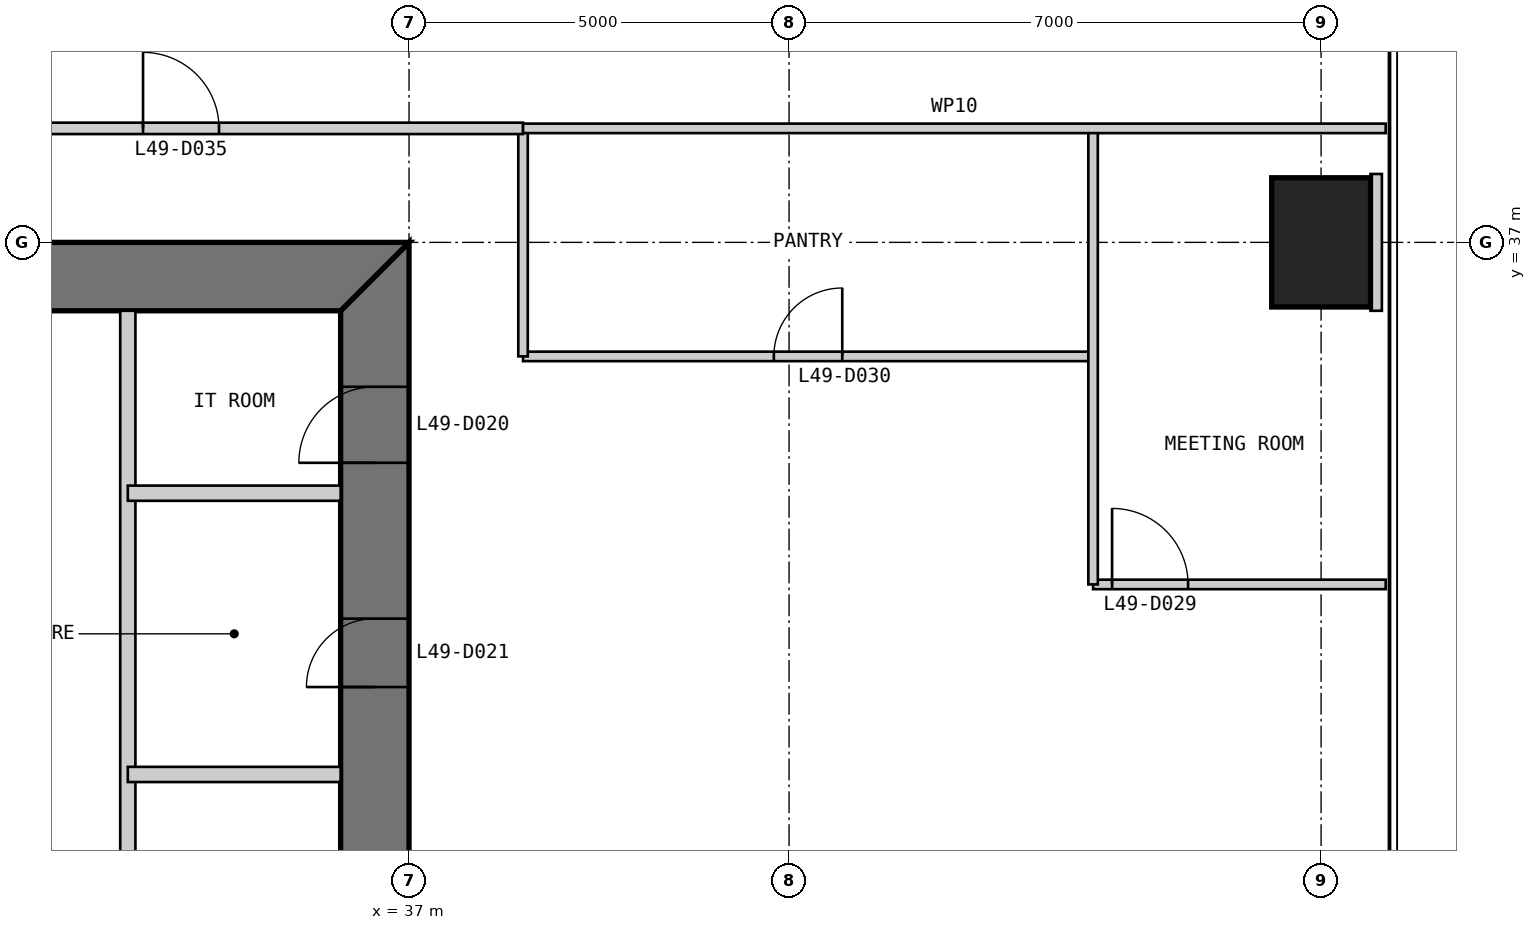
"""IFC4 building model, lengths in metres.
Left out: names, types, materials, properties, quantities, classifications, styles, units other than length and angle.
Written with IfcOpenShell. Run it as: python <this file> out.ifc"""

import sys

from ifc_helpers import new_model, si_unit, direction, frame, frame_2d, origin, origin_2d, place, context, subcontext, project, spatial, polyline, rectangle, outline, extrude, element, fill, save


model = new_model("IFC4")
c1 = context("Model", 3, precision=1e-05, world=origin(), true_north=direction((0.0, 1.0)))
c2 = subcontext(c1, "Body", "Model", "MODEL_VIEW")
j1 = project(units=[si_unit("LENGTHUNIT", "METRE"), si_unit("PLANEANGLEUNIT", "RADIAN")], contexts=[c1])
p1 = place(None, origin())
s1 = spatial("IfcSite", under=j1, at=p1, CompositionType="ELEMENT")
p2 = place(p1, origin())
s2 = spatial("IfcBuilding", under=s1, at=p2, CompositionType="ELEMENT")
p3 = place(p2, frame((0.0, 0.0, 209.8)))
s3 = spatial("IfcBuildingStorey", under=s2, at=p3, CompositionType="ELEMENT", Elevation=209.8)
p4 = place(p3, frame((49.0, 37.0, 0.0), z_axis=(0.0, 0.0, 1.0), x_axis=(1.0, 0.0, 0.0)))
e1 = element("IfcColumn", 1, at=p4, inside=s3, PredefinedType="COLUMN", context=c2, shape_type="SweptSolid", body=[
    extrude(rectangle(XDim=1.3, YDim=1.7, at=origin_2d()), origin(), (0.0, 0.0, 1.0), 4.0),
])
p5 = place(p3, frame((36.55, 13.9, 0.0), z_axis=(0.0, 0.0, 1.0), x_axis=(0.0, 1.0, 0.0)))
e2 = element("IfcWall", 2, at=p5, inside=s3, PredefinedType="SHEAR", context=c2, shape_type="SweptSolid", body=[
    extrude(outline(polyline([(-0.9, -0.45), (23.1, -0.45), (22.2, 0.45), (0.0, 0.45), (-0.9, -0.45)])), origin(), (0.0, 0.0, 1.0), 4.0),
])
p6 = place(p5, frame((20.2, 0.0, 0.0)))
e3 = element("IfcOpeningElement", 3, at=p6, cuts=e2, PredefinedType="OPENING", context=c2, shape_type="SweptSolid", body=[
    extrude(rectangle(XDim=1.0, YDim=2.2, at=frame_2d((0.5, 1.1))), frame((0.0, 0.46, 0.0), z_axis=(0.0, -1.0, 0.0), x_axis=(1.0, 0.0, 0.0)), (0.0, 0.0, 1.0), 0.92),
])
p7 = place(p5, frame((17.25, 0.0, 0.0)))
e4 = element("IfcOpeningElement", 4, at=p7, cuts=e2, PredefinedType="OPENING", context=c2, shape_type="SweptSolid", body=[
    extrude(rectangle(XDim=0.9, YDim=2.2, at=frame_2d((0.45, 1.1))), frame((0.0, 0.46, 0.0), z_axis=(0.0, -1.0, 0.0), x_axis=(1.0, 0.0, 0.0)), (0.0, 0.0, 1.0), 0.92),
])
p8 = place(p3, frame((37.0, 36.55, 0.0), z_axis=(0.0, 0.0, 1.0), x_axis=(-1.0, 0.0, 0.0)))
e5 = element("IfcWall", 5, at=p8, inside=s3, PredefinedType="SHEAR", context=c2, shape_type="SweptSolid", body=[
    extrude(outline(polyline([(0.0, -0.45), (24.0, -0.45), (23.1, 0.45), (0.9, 0.45), (0.0, -0.45)])), origin(), (0.0, 0.0, 1.0), 4.0),
])
p9 = place(p8, frame((4.9, 0.0, 0.0)))
e6 = element("IfcOpeningElement", 6, at=p9, cuts=e5, PredefinedType="OPENING", context=c2, shape_type="SweptSolid", body=[
    extrude(rectangle(XDim=1.0, YDim=2.2, at=frame_2d((0.5, 1.1))), frame((0.0, 0.46, 0.0), z_axis=(0.0, -1.0, 0.0), x_axis=(1.0, 0.0, 0.0)), (0.0, 0.0, 1.0), 0.92),
])
p10 = place(p8, frame((8.9, 0.0, 0.0)))
e7 = element("IfcOpeningElement", 7, at=p10, cuts=e5, PredefinedType="OPENING", context=c2, shape_type="SweptSolid", body=[
    extrude(rectangle(XDim=1.1, YDim=2.2, at=frame_2d((0.55, 1.1))), frame((0.0, 0.46, 0.0), z_axis=(0.0, -1.0, 0.0), x_axis=(1.0, 0.0, 0.0)), (0.0, 0.0, 1.0), 0.92),
])
p11 = place(p8, frame((15.05, 0.0, 0.0)))
e8 = element("IfcOpeningElement", 8, at=p11, cuts=e5, PredefinedType="OPENING", context=c2, shape_type="SweptSolid", body=[
    extrude(rectangle(XDim=0.9, YDim=2.2, at=frame_2d((0.45, 1.1))), frame((0.0, 0.46, 0.0), z_axis=(0.0, -1.0, 0.0), x_axis=(1.0, 0.0, 0.0)), (0.0, 0.0, 1.0), 0.92),
])
p12 = place(p8, frame((17.9, 0.0, 0.0)))
e9 = element("IfcOpeningElement", 9, at=p12, cuts=e5, PredefinedType="OPENING", context=c2, shape_type="SweptSolid", body=[
    extrude(rectangle(XDim=1.0, YDim=2.2, at=frame_2d((0.5, 1.1))), frame((0.0, 0.46, 0.0), z_axis=(0.0, -1.0, 0.0), x_axis=(1.0, 0.0, 0.0)), (0.0, 0.0, 1.0), 0.92),
])
p13 = place(p8, frame((21.4, 0.0, 0.0)))
e10 = element("IfcOpeningElement", 10, at=p13, cuts=e5, PredefinedType="OPENING", context=c2, shape_type="SweptSolid", body=[
    extrude(rectangle(XDim=1.0, YDim=2.2, at=frame_2d((0.5, 1.1))), frame((0.0, 0.46, 0.0), z_axis=(0.0, -1.0, 0.0), x_axis=(1.0, 0.0, 0.0)), (0.0, 0.0, 1.0), 0.92),
])
p14 = place(p3, frame((33.3, 36.1, 0.0), z_axis=(0.0, 0.0, 1.0), x_axis=(0.0, -1.0, 0.0)))
e11 = element("IfcWall", 11, at=p14, inside=s3, PredefinedType="PARTITIONING", context=c2, shape_type="SweptSolid", body=[
    extrude(rectangle(XDim=16.1, YDim=0.2, at=frame_2d((8.05, 0.0))), origin(), (0.0, 0.0, 1.0), 3.8),
])
for number, where, z_axis, x_axis in (
    (12, (36.1, 30.0, 0.0), (0.0, 0.0, 1.0), (-1.0, 0.0, 0.0)),
    (13, (36.1, 33.7, 0.0), (0.0, 0.0, 1.0), (-1.0, 0.0, 0.0)),
):
    element("IfcWall", number, at=place(p3, frame(where, z_axis=z_axis, x_axis=x_axis)), inside=s3, PredefinedType="PARTITIONING", context=c2, shape_type="SweptSolid", body=[
        extrude(rectangle(XDim=2.8, YDim=0.2, at=frame_2d((1.4, 0.0))), origin(), (0.0, 0.0, 1.0), 3.8),
    ])
p15 = place(p3, frame((49.85, 32.5, 0.0), z_axis=(0.0, 0.0, 1.0), x_axis=(-1.0, 0.0, 0.0)))
e14 = element("IfcWall", 14, at=p15, inside=s3, PredefinedType="PARTITIONING", context=c2, shape_type="SweptSolid", body=[
    extrude(rectangle(XDim=3.85, YDim=0.125, at=frame_2d((1.925, 0.0))), origin(), (0.0, 0.0, 1.0), 3.85),
])
p16 = place(p15, frame((2.6, 0.0, 0.0)))
e15 = element("IfcOpeningElement", 15, at=p16, cuts=e14, PredefinedType="OPENING", context=c2, shape_type="SweptSolid", body=[
    extrude(rectangle(XDim=1.0, YDim=2.2, at=frame_2d((0.5, 1.1))), frame((0.0, 0.073, 0.0), z_axis=(0.0, -1.0, 0.0), x_axis=(1.0, 0.0, 0.0)), (0.0, 0.0, 1.0), 0.145),
])
p17 = place(p3, frame((46.0, 35.5, 0.0), z_axis=(0.0, 0.0, 1.0), x_axis=(-1.0, 0.0, 0.0)))
e16 = element("IfcWall", 16, at=p17, inside=s3, PredefinedType="PARTITIONING", context=c2, shape_type="SweptSolid", body=[
    extrude(rectangle(XDim=7.5, YDim=0.125, at=frame_2d((3.75, 0.0))), origin(), (0.0, 0.0, 1.0), 3.85),
])
p18 = place(p17, frame((3.3, 0.0, 0.0)))
e17 = element("IfcOpeningElement", 17, at=p18, cuts=e16, PredefinedType="OPENING", context=c2, shape_type="SweptSolid", body=[
    extrude(rectangle(XDim=0.9, YDim=2.2, at=frame_2d((0.45, 1.1))), frame((0.0, 0.073, 0.0), z_axis=(0.0, -1.0, 0.0), x_axis=(1.0, 0.0, 0.0)), (0.0, 0.0, 1.0), 0.145),
])
p19 = place(p3, frame((46.0, 32.5, 0.0), z_axis=(0.0, 0.0, 1.0), x_axis=(0.0, 1.0, 0.0)))
e18 = element("IfcWall", 18, at=p19, inside=s3, PredefinedType="PARTITIONING", context=c2, shape_type="SweptSolid", body=[
    extrude(rectangle(XDim=6.0, YDim=0.125, at=frame_2d((3.0, 0.0))), origin(), (0.0, 0.0, 1.0), 3.238),
])
p20 = place(p3, frame((38.5, 35.5, 0.0), z_axis=(0.0, 0.0, 1.0), x_axis=(0.0, 1.0, 0.0)))
e19 = element("IfcWall", 19, at=p20, inside=s3, PredefinedType="PARTITIONING", context=c2, shape_type="SweptSolid", body=[
    extrude(rectangle(XDim=3.0, YDim=0.125, at=frame_2d((1.5, 0.0))), origin(), (0.0, 0.0, 1.0), 3.85),
])
p21 = place(p3, frame((38.5, 38.5, 0.0), z_axis=(0.0, 0.0, 1.0), x_axis=(-1.0, 0.0, 0.0)))
e20 = element("IfcWall", 20, at=p21, inside=s3, PredefinedType="PARTITIONING", context=c2, shape_type="SweptSolid", body=[
    extrude(rectangle(XDim=27.0, YDim=0.15, at=frame_2d((13.5, 0.0))), origin(), (0.0, 0.0, 1.0), 3.85),
])
p22 = place(p21, frame((13.0, 0.0, 0.0)))
e21 = element("IfcOpeningElement", 21, at=p22, cuts=e20, PredefinedType="OPENING", context=c2, shape_type="SweptSolid", body=[
    extrude(rectangle(XDim=1.0, YDim=2.2, at=frame_2d((0.5, 1.1))), frame((0.0, 0.085, 0.0), z_axis=(0.0, -1.0, 0.0), x_axis=(1.0, 0.0, 0.0)), (0.0, 0.0, 1.0), 0.17),
])
p23 = place(p21, frame((4.0, 0.0, 0.0)))
e22 = element("IfcOpeningElement", 22, at=p23, cuts=e20, PredefinedType="OPENING", context=c2, shape_type="SweptSolid", body=[
    extrude(rectangle(XDim=1.0, YDim=2.2, at=frame_2d((0.5, 1.1))), frame((0.0, 0.085, 0.0), z_axis=(0.0, -1.0, 0.0), x_axis=(1.0, 0.0, 0.0)), (0.0, 0.0, 1.0), 0.17),
])
p24 = place(p21, frame((22.0, 0.0, 0.0)))
e23 = element("IfcOpeningElement", 23, at=p24, cuts=e20, PredefinedType="OPENING", context=c2, shape_type="SweptSolid", body=[
    extrude(rectangle(XDim=1.0, YDim=2.2, at=frame_2d((0.5, 1.1))), frame((0.0, 0.085, 0.0), z_axis=(0.0, -1.0, 0.0), x_axis=(1.0, 0.0, 0.0)), (0.0, 0.0, 1.0), 0.17),
])
p25 = place(p21, frame((25.0, 0.0, 0.0)))
e24 = element("IfcOpeningElement", 24, at=p25, cuts=e20, PredefinedType="OPENING", context=c2, shape_type="SweptSolid", body=[
    extrude(rectangle(XDim=1.0, YDim=2.2, at=frame_2d((0.5, 1.1))), frame((0.0, 0.085, 0.0), z_axis=(0.0, -1.0, 0.0), x_axis=(1.0, 0.0, 0.0)), (0.0, 0.0, 1.0), 0.17),
])
p26 = place(p3, frame((49.85, 38.5, 0.0), z_axis=(0.0, 0.0, 1.0), x_axis=(-1.0, 0.0, 0.0)))
e25 = element("IfcWall", 25, at=p26, inside=s3, PredefinedType="PARTITIONING", context=c2, shape_type="SweptSolid", body=[
    extrude(rectangle(XDim=11.35, YDim=0.125, at=frame_2d((5.675, 0.0))), origin(), (0.0, 0.0, 1.0), 3.85),
])
p27 = place(p3, frame((49.8, 37.0, 0.0), z_axis=(0.0, 0.0, 1.0), x_axis=(-1.0, 0.0, 0.0)))
e26 = element("IfcWall", 26, at=p27, inside=s3, PredefinedType="PARTITIONING", context=c2, shape_type="SweptSolid", body=[
    extrude(rectangle(XDim=0.15, YDim=1.8, at=frame_2d((0.075, 0.0))), origin(), (0.0, 0.0, 1.0), 3.85),
])
p28 = place(p6, origin())
e27 = element("IfcDoor", 27, at=p28, inside=s3, OperationType="SINGLE_SWING_LEFT", PredefinedType="DOOR", context=c2, shape_type="SweptSolid", body=[
    extrude(rectangle(XDim=1.0, YDim=2.2, at=frame_2d((0.5, 1.1))), frame((0.0, 0.025, 0.0), z_axis=(0.0, -1.0, 0.0), x_axis=(1.0, 0.0, 0.0)), (0.0, 0.0, 1.0), 0.05),
    extrude(outline(polyline([(0.0, 0.0), (0.04, 0.0), (0.04, 2.16), (0.96, 2.16), (0.96, 0.0), (1.0, 0.0), (1.0, 2.2), (0.0, 2.2), (0.0, 0.0)])), frame((0.0, 0.3, 0.0), z_axis=(0.0, -1.0, 0.0), x_axis=(1.0, 0.0, 0.0)), (0.0, 0.0, 1.0), 0.6),
])
fill(e3, e27)
p29 = place(p7, origin())
e28 = element("IfcDoor", 28, at=p29, inside=s3, OperationType="SINGLE_SWING_LEFT", PredefinedType="DOOR", context=c2, shape_type="SweptSolid", body=[
    extrude(rectangle(XDim=0.9, YDim=2.2, at=frame_2d((0.45, 1.1))), frame((0.0, 0.025, 0.0), z_axis=(0.0, -1.0, 0.0), x_axis=(1.0, 0.0, 0.0)), (0.0, 0.0, 1.0), 0.05),
    extrude(outline(polyline([(0.0, 0.0), (0.04, 0.0), (0.04, 2.16), (0.86, 2.16), (0.86, 0.0), (0.9, 0.0), (0.9, 2.2), (0.0, 2.2), (0.0, 0.0)])), frame((0.0, 0.3, 0.0), z_axis=(0.0, -1.0, 0.0), x_axis=(1.0, 0.0, 0.0)), (0.0, 0.0, 1.0), 0.6),
])
fill(e4, e28)
p30 = place(p16, frame((1.0, 0.0, 0.0), z_axis=(0.0, 0.0, 1.0), x_axis=(-1.0, 0.0, 0.0)))
e29 = element("IfcDoor", 29, at=p30, inside=s3, OperationType="SINGLE_SWING_LEFT", PredefinedType="DOOR", context=c2, shape_type="SweptSolid", body=[
    extrude(rectangle(XDim=1.0, YDim=2.2, at=frame_2d((0.5, 1.1))), frame((0.0, 0.025, 0.0), z_axis=(0.0, -1.0, 0.0), x_axis=(1.0, 0.0, 0.0)), (0.0, 0.0, 1.0), 0.05),
])
fill(e15, e29)
p31 = place(p18, frame((0.9, 0.0, 0.0), z_axis=(0.0, 0.0, 1.0), x_axis=(-1.0, 0.0, 0.0)))
e30 = element("IfcDoor", 30, at=p31, inside=s3, OperationType="SINGLE_SWING_RIGHT", PredefinedType="DOOR", context=c2, shape_type="SweptSolid", body=[
    extrude(rectangle(XDim=0.9, YDim=2.2, at=frame_2d((0.45, 1.1))), frame((0.0, 0.025, 0.0), z_axis=(0.0, -1.0, 0.0), x_axis=(1.0, 0.0, 0.0)), (0.0, 0.0, 1.0), 0.05),
])
fill(e17, e30)
p32 = place(p23, frame((1.0, 0.0, 0.0), z_axis=(0.0, 0.0, 1.0), x_axis=(-1.0, 0.0, 0.0)))
e31 = element("IfcDoor", 31, at=p32, inside=s3, OperationType="SINGLE_SWING_LEFT", PredefinedType="DOOR", context=c2, shape_type="SweptSolid", body=[
    extrude(rectangle(XDim=1.0, YDim=2.2, at=frame_2d((0.5, 1.1))), frame((0.0, 0.025, 0.0), z_axis=(0.0, -1.0, 0.0), x_axis=(1.0, 0.0, 0.0)), (0.0, 0.0, 1.0), 0.05),
])
fill(e22, e31)
save(model, sys.argv[1])
